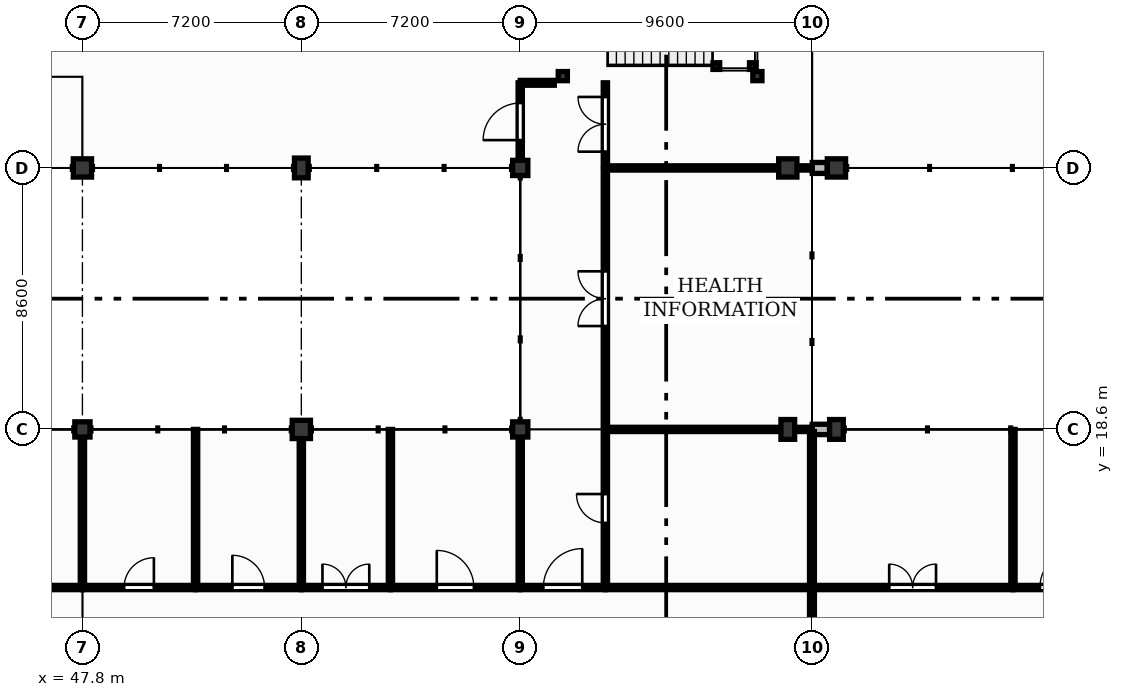
"""IFC4 building model, lengths in metres.
Left out: names, types, materials, properties, quantities, classifications, styles, units other than length and angle.
Written with IfcOpenShell. Run it as: python <this file> out.ifc"""

import sys

from ifc_helpers import new_model, si_unit, direction, frame, frame_2d, origin, origin_2d, place, context, subcontext, project, spatial, rectangle, hollow_circle, i_section, extrude, element, fill, save


model = new_model("IFC4")
c1 = context("Model", 3, precision=1e-05, world=origin(), true_north=direction((0.0, 1.0)))
c2 = subcontext(c1, "Body", "Model", "MODEL_VIEW")
j1 = project(units=[si_unit("LENGTHUNIT", "METRE"), si_unit("PLANEANGLEUNIT", "RADIAN")], contexts=[c1])
p1 = place(None, origin())
s1 = spatial("IfcSite", under=j1, at=p1, CompositionType="ELEMENT")
p2 = place(p1, origin())
s2 = spatial("IfcBuilding", under=s1, at=p2, CompositionType="ELEMENT")
p3 = place(p2, origin())
s3 = spatial("IfcBuildingStorey", under=s2, at=p3, CompositionType="ELEMENT", Elevation=0.0)
p4 = place(p3, frame((72.6, 18.6, 0.0), z_axis=(0.0, 0.0, 1.0), x_axis=(1.0, 0.0, 0.0)))
e1 = element("IfcColumn", 1, at=p4, inside=s3, PredefinedType="COLUMN", context=c2, shape_type="SweptSolid", body=[
    extrude(rectangle(XDim=0.45, YDim=0.65, at=origin_2d()), origin(), (0.0, 0.0, 1.0), 4.2),
])
p5 = place(p3, frame((72.6, 27.2, 0.0), z_axis=(0.0, 0.0, 1.0), x_axis=(1.0, 0.0, 0.0)))
e2 = element("IfcColumn", 2, at=p5, inside=s3, PredefinedType="COLUMN", context=c2, shape_type="SweptSolid", body=[
    extrude(rectangle(XDim=0.6, YDim=0.6, at=origin_2d()), origin(), (0.0, 0.0, 1.0), 4.2),
])
p6 = place(p3, frame((47.8, 18.6, 0.0), z_axis=(0.0, 0.0, 1.0), x_axis=(1.0, 0.0, 0.0)))
e3 = element("IfcColumn", 3, at=p6, inside=s3, PredefinedType="COLUMN", context=c2, shape_type="SweptSolid", body=[
    extrude(rectangle(XDim=0.5, YDim=0.5, at=origin_2d()), origin(), (0.0, 0.0, 1.0), 4.2),
])
for number, where, z_axis, x_axis in (
    (4, (47.8, 27.2, 0.0), (0.0, 0.0, 1.0), (1.0, 0.0, 0.0)),
    (5, (55.0, 18.6, 0.0), (0.0, 0.0, 1.0), (1.0, 0.0, 0.0)),
):
    element("IfcColumn", number, at=place(p3, frame(where, z_axis=z_axis, x_axis=x_axis)), inside=s3, PredefinedType="COLUMN", context=c2, shape_type="SweptSolid", body=[
        extrude(rectangle(XDim=0.6, YDim=0.6, at=origin_2d()), origin(), (0.0, 0.0, 1.0), 4.2),
    ])
p7 = place(p3, frame((55.0, 27.2, 0.0), z_axis=(0.0, 0.0, 1.0), x_axis=(1.0, 0.0, 0.0)))
e6 = element("IfcColumn", 6, at=p7, inside=s3, PredefinedType="COLUMN", context=c2, shape_type="SweptSolid", body=[
    extrude(rectangle(XDim=0.45, YDim=0.65, at=origin_2d()), origin(), (0.0, 0.0, 1.0), 4.2),
])
for number, where, z_axis, x_axis in (
    (7, (62.2, 18.6, 0.0), (0.0, 0.0, 1.0), (1.0, 0.0, 0.0)),
    (8, (62.2, 27.2, 0.0), (0.0, 0.0, 1.0), (1.0, 0.0, 0.0)),
):
    element("IfcColumn", number, at=place(p3, frame(where, z_axis=z_axis, x_axis=x_axis)), inside=s3, PredefinedType="COLUMN", context=c2, shape_type="SweptSolid", body=[
        extrude(rectangle(XDim=0.5, YDim=0.5, at=origin_2d()), origin(), (0.0, 0.0, 1.0), 4.2),
    ])
p8 = place(p3, frame((71.0, 18.6, 0.0), z_axis=(0.0, 0.0, 1.0), x_axis=(1.0, 0.0, 0.0)))
e9 = element("IfcColumn", 9, at=p8, inside=s3, PredefinedType="COLUMN", context=c2, shape_type="SweptSolid", body=[
    extrude(rectangle(XDim=0.45, YDim=0.65, at=origin_2d()), origin(), (0.0, 0.0, 1.0), 4.2),
])
p9 = place(p3, frame((71.0, 27.2, 0.0), z_axis=(0.0, 0.0, 1.0), x_axis=(1.0, 0.0, 0.0)))
e10 = element("IfcColumn", 10, at=p9, inside=s3, PredefinedType="COLUMN", context=c2, shape_type="SweptSolid", body=[
    extrude(rectangle(XDim=0.6, YDim=0.6, at=origin_2d()), origin(), (0.0, 0.0, 1.0), 4.2),
])
p10 = place(p3, frame((71.805, 18.6, 0.0), z_axis=(0.0, 0.0, 1.0), x_axis=(1.0, 0.0, 0.0)))
e11 = element("IfcWall", 11, at=p10, inside=s3, PredefinedType="SOLIDWALL", context=c2, shape_type="SweptSolid", body=[
    extrude(rectangle(XDim=0.57, YDim=0.34, at=frame_2d((0.285, 0.0))), origin(), (0.0, 0.0, 1.0), 4.2),
])
p11 = place(p3, frame((71.805, 27.2, 0.0), z_axis=(0.0, 0.0, 1.0), x_axis=(1.0, 0.0, 0.0)))
e12 = element("IfcWall", 12, at=p11, inside=s3, PredefinedType="SOLIDWALL", context=c2, shape_type="SweptSolid", body=[
    extrude(rectangle(XDim=0.495, YDim=0.36, at=frame_2d((0.248, 0.0))), origin(), (0.0, 0.0, 1.0), 4.2),
])
for number, where, z_axis, x_axis in (
    (13, (63.6, 30.22, 0.0), (0.0, 0.0, 1.0), (1.0, 0.0, 0.0)),
    (14, (70.0, 30.22, 0.0), (0.0, 0.0, 1.0), (1.0, 0.0, 0.0)),
):
    element("IfcColumn", number, at=place(p3, frame(where, z_axis=z_axis, x_axis=x_axis)), inside=s3, PredefinedType="COLUMN", context=c2, shape_type="SweptSolid", body=[
        extrude(i_section(OverallWidth=0.3, OverallDepth=0.3, WebThickness=0.011, FlangeThickness=0.019, FilletRadius=0.027, at=origin_2d()), origin(), (0.0, 0.0, 1.0), 4.2),
    ])
for number, where, z_axis, x_axis in (
    (15, (68.65, 30.55, 0.0), (0.0, 0.0, 1.0), (1.0, 0.0, 0.0)),
    (16, (69.85, 30.55, 0.0), (0.0, 0.0, 1.0), (1.0, 0.0, 0.0)),
):
    element("IfcColumn", number, at=place(p3, frame(where, z_axis=z_axis, x_axis=x_axis)), inside=s3, PredefinedType="COLUMN", context=c2, shape_type="SweptSolid", body=[
        extrude(hollow_circle(Radius=0.11, WallThickness=0.01, at=origin_2d()), origin(), (0.0, 0.0, 1.0), 2.03),
    ])
p12 = place(p3, frame((40.6, 13.4, 0.0), z_axis=(0.0, 0.0, 1.0), x_axis=(1.0, 0.0, 0.0)))
e17 = element("IfcWall", 17, at=p12, inside=s3, PredefinedType="PARTITIONING", context=c2, shape_type="SweptSolid", body=[
    extrude(rectangle(XDim=7.2, YDim=0.14, at=frame_2d((3.6, 0.0))), origin(), (0.0, 0.0, 1.0), 4.18),
])
p13 = place(p12, frame((2.99, 0.0, 0.0)))
e18 = element("IfcOpeningElement", 18, at=p13, cuts=e17, PredefinedType="OPENING", context=c2, shape_type="SweptSolid", body=[
    extrude(rectangle(XDim=1.22, YDim=2.1, at=frame_2d((0.61, 1.05))), frame((0.0, 0.08, 0.0), z_axis=(0.0, -1.0, 0.0), x_axis=(1.0, 0.0, 0.0)), (0.0, 0.0, 1.0), 0.16),
])
p14 = place(p3, frame((47.8, 13.47, 0.0), z_axis=(0.0, 0.0, 1.0), x_axis=(0.0, 1.0, 0.0)))
e19 = element("IfcWall", 19, at=p14, inside=s3, PredefinedType="PARTITIONING", context=c2, shape_type="SweptSolid", body=[
    extrude(rectangle(XDim=4.88, YDim=0.14, at=frame_2d((2.44, 0.0))), origin(), (0.0, 0.0, 1.0), 3.5),
])
p15 = place(p3, frame((47.8, 13.4, 0.0), z_axis=(0.0, 0.0, 1.0), x_axis=(1.0, 0.0, 0.0)))
e20 = element("IfcWall", 20, at=p15, inside=s3, PredefinedType="PARTITIONING", context=c2, shape_type="SweptSolid", body=[
    extrude(rectangle(XDim=3.722, YDim=0.14, at=frame_2d((1.861, 0.0))), origin(), (0.0, 0.0, 1.0), 4.18),
])
p16 = place(p15, frame((1.371, 0.0, 0.0)))
e21 = element("IfcOpeningElement", 21, at=p16, cuts=e20, PredefinedType="OPENING", context=c2, shape_type="SweptSolid", body=[
    extrude(rectangle(XDim=0.98, YDim=2.15, at=frame_2d((0.49, 1.075))), frame((0.0, 0.08, 0.0), z_axis=(0.0, -1.0, 0.0), x_axis=(1.0, 0.0, 0.0)), (0.0, 0.0, 1.0), 0.16),
])
p17 = place(p3, frame((51.522, 13.47, 0.0), z_axis=(0.0, 0.0, 1.0), x_axis=(0.0, 1.0, 0.0)))
e22 = element("IfcWall", 22, at=p17, inside=s3, PredefinedType="PARTITIONING", context=c2, shape_type="SweptSolid", body=[
    extrude(rectangle(XDim=5.13, YDim=0.14, at=frame_2d((2.565, 0.0))), origin(), (0.0, 0.0, 1.0), 4.18),
])
p18 = place(p3, frame((51.522, 13.4, 0.0), z_axis=(0.0, 0.0, 1.0), x_axis=(1.0, 0.0, 0.0)))
e23 = element("IfcWall", 23, at=p18, inside=s3, PredefinedType="PARTITIONING", context=c2, shape_type="SweptSolid", body=[
    extrude(rectangle(XDim=3.478, YDim=0.14, at=frame_2d((1.739, 0.0))), origin(), (0.0, 0.0, 1.0), 4.18),
])
p19 = place(p18, frame((1.209, 0.0, 0.0)))
e24 = element("IfcOpeningElement", 24, at=p19, cuts=e23, PredefinedType="OPENING", context=c2, shape_type="SweptSolid", body=[
    extrude(rectangle(XDim=1.06, YDim=2.15, at=frame_2d((0.53, 1.075))), frame((0.0, 0.08, 0.0), z_axis=(0.0, -1.0, 0.0), x_axis=(1.0, 0.0, 0.0)), (0.0, 0.0, 1.0), 0.16),
])
p20 = place(p3, frame((55.0, 13.47, 0.0), z_axis=(0.0, 0.0, 1.0), x_axis=(0.0, 1.0, 0.0)))
e25 = element("IfcWall", 25, at=p20, inside=s3, PredefinedType="PARTITIONING", context=c2, shape_type="SweptSolid", body=[
    extrude(rectangle(XDim=4.83, YDim=0.14, at=frame_2d((2.415, 0.0))), origin(), (0.0, 0.0, 1.0), 3.5),
])
p21 = place(p3, frame((55.0, 13.4, 0.0), z_axis=(0.0, 0.0, 1.0), x_axis=(1.0, 0.0, 0.0)))
e26 = element("IfcWall", 26, at=p21, inside=s3, PredefinedType="PARTITIONING", context=c2, shape_type="SweptSolid", body=[
    extrude(rectangle(XDim=2.93, YDim=0.14, at=frame_2d((1.465, 0.0))), origin(), (0.0, 0.0, 1.0), 4.18),
])
p22 = place(p21, frame((0.695, 0.0, 0.0)))
e27 = element("IfcOpeningElement", 27, at=p22, cuts=e26, PredefinedType="OPENING", context=c2, shape_type="SweptSolid", body=[
    extrude(rectangle(XDim=1.54, YDim=2.25, at=frame_2d((0.77, 1.125))), frame((0.0, 0.08, 0.0), z_axis=(0.0, -1.0, 0.0), x_axis=(1.0, 0.0, 0.0)), (0.0, 0.0, 1.0), 0.16),
])
p23 = place(p3, frame((57.93, 13.47, 0.0), z_axis=(0.0, 0.0, 1.0), x_axis=(0.0, 1.0, 0.0)))
e28 = element("IfcWall", 28, at=p23, inside=s3, PredefinedType="PARTITIONING", context=c2, shape_type="SweptSolid", body=[
    extrude(rectangle(XDim=5.13, YDim=0.14, at=frame_2d((2.565, 0.0))), origin(), (0.0, 0.0, 1.0), 4.18),
])
p24 = place(p3, frame((57.93, 13.4, 0.0), z_axis=(0.0, 0.0, 1.0), x_axis=(1.0, 0.0, 0.0)))
e29 = element("IfcWall", 29, at=p24, inside=s3, PredefinedType="PARTITIONING", context=c2, shape_type="SweptSolid", body=[
    extrude(rectangle(XDim=4.27, YDim=0.14, at=frame_2d((2.135, 0.0))), origin(), (0.0, 0.0, 1.0), 4.18),
])
p25 = place(p24, frame((1.525, 0.0, 0.0)))
e30 = element("IfcOpeningElement", 30, at=p25, cuts=e29, PredefinedType="OPENING", context=c2, shape_type="SweptSolid", body=[
    extrude(rectangle(XDim=1.22, YDim=2.1, at=frame_2d((0.61, 1.05))), frame((0.0, 0.08, 0.0), z_axis=(0.0, -1.0, 0.0), x_axis=(1.0, 0.0, 0.0)), (0.0, 0.0, 1.0), 0.16),
])
p26 = place(p3, frame((62.2, 13.47, 0.0), z_axis=(0.0, 0.0, 1.0), x_axis=(0.0, 1.0, 0.0)))
e31 = element("IfcWall", 31, at=p26, inside=s3, PredefinedType="PARTITIONING", context=c2, shape_type="SweptSolid", body=[
    extrude(rectangle(XDim=4.88, YDim=0.14, at=frame_2d((2.44, 0.0))), origin(), (0.0, 0.0, 1.0), 3.5),
])
p27 = place(p3, frame((62.2, 13.4, 0.0), z_axis=(0.0, 0.0, 1.0), x_axis=(1.0, 0.0, 0.0)))
e32 = element("IfcWall", 32, at=p27, inside=s3, PredefinedType="PARTITIONING", context=c2, shape_type="SweptSolid", body=[
    extrude(rectangle(XDim=2.8, YDim=0.14, at=frame_2d((1.4, 0.0))), origin(), (0.0, 0.0, 1.0), 4.18),
])
p28 = place(p27, frame((0.76, 0.0, 0.0)))
e33 = element("IfcOpeningElement", 33, at=p28, cuts=e32, PredefinedType="OPENING", context=c2, shape_type="SweptSolid", body=[
    extrude(rectangle(XDim=1.28, YDim=2.2, at=frame_2d((0.64, 1.1))), frame((0.0, 0.08, 0.0), z_axis=(0.0, -1.0, 0.0), x_axis=(1.0, 0.0, 0.0)), (0.0, 0.0, 1.0), 0.16),
])
p29 = place(p3, frame((62.2, 27.45, 0.0), z_axis=(0.0, 0.0, 1.0), x_axis=(0.0, 1.0, 0.0)))
e34 = element("IfcWall", 34, at=p29, inside=s3, PredefinedType="PARTITIONING", context=c2, shape_type="SweptSolid", body=[
    extrude(rectangle(XDim=2.55, YDim=0.14, at=frame_2d((1.275, 0.0))), origin(), (0.0, 0.0, 1.0), 3.4),
])
p30 = place(p29, frame((0.665, 0.0, 0.0)))
e35 = element("IfcOpeningElement", 35, at=p30, cuts=e34, PredefinedType="OPENING", context=c2, shape_type="SweptSolid", body=[
    extrude(rectangle(XDim=1.22, YDim=2.1, at=frame_2d((0.61, 1.05))), frame((0.0, 0.08, 0.0), z_axis=(0.0, -1.0, 0.0), x_axis=(1.0, 0.0, 0.0)), (0.0, 0.0, 1.0), 0.16),
])
p31 = place(p3, frame((65.0, 13.47, 0.0), z_axis=(0.0, 0.0, 1.0), x_axis=(0.0, 1.0, 0.0)))
e36 = element("IfcWall", 36, at=p31, inside=s3, PredefinedType="PARTITIONING", context=c2, shape_type="SweptSolid", body=[
    extrude(rectangle(XDim=5.06, YDim=0.14, at=frame_2d((2.53, 0.0))), origin(), (0.0, 0.0, 1.0), 4.18),
])
p32 = place(p31, frame((2.055, 0.0, 0.0)))
e37 = element("IfcOpeningElement", 37, at=p32, cuts=e36, PredefinedType="OPENING", context=c2, shape_type="SweptSolid", body=[
    extrude(rectangle(XDim=0.95, YDim=2.1, at=frame_2d((0.475, 1.05))), frame((0.0, 0.08, 0.0), z_axis=(0.0, -1.0, 0.0), x_axis=(1.0, 0.0, 0.0)), (0.0, 0.0, 1.0), 0.16),
])
p33 = place(p3, frame((65.0, 13.4, 0.0), z_axis=(0.0, 0.0, 1.0), x_axis=(1.0, 0.0, 0.0)))
e38 = element("IfcWall", 38, at=p33, inside=s3, PredefinedType="PARTITIONING", context=c2, shape_type="SweptSolid", body=[
    extrude(rectangle(XDim=6.795, YDim=0.14, at=frame_2d((3.397, 0.0))), origin(), (0.0, 0.0, 1.0), 4.18),
])
p34 = place(p3, frame((65.0, 18.67, 0.0), z_axis=(0.0, 0.0, 1.0), x_axis=(0.0, 1.0, 0.0)))
e39 = element("IfcWall", 39, at=p34, inside=s3, PredefinedType="PARTITIONING", context=c2, shape_type="SweptSolid", body=[
    extrude(rectangle(XDim=8.46, YDim=0.14, at=frame_2d((4.23, 0.0))), origin(), (0.0, 0.0, 1.0), 4.18),
])
p35 = place(p34, frame((3.33, 0.0, 0.0)))
e40 = element("IfcOpeningElement", 40, at=p35, cuts=e39, PredefinedType="OPENING", context=c2, shape_type="SweptSolid", body=[
    extrude(rectangle(XDim=1.8, YDim=2.3, at=frame_2d((0.9, 1.15))), frame((0.0, 0.08, 0.0), z_axis=(0.0, -1.0, 0.0), x_axis=(1.0, 0.0, 0.0)), (0.0, 0.0, 1.0), 0.16),
])
p36 = place(p3, frame((65.0, 18.6, 0.0), z_axis=(0.0, 0.0, 1.0), x_axis=(1.0, 0.0, 0.0)))
e41 = element("IfcWall", 41, at=p36, inside=s3, PredefinedType="PARTITIONING", context=c2, shape_type="SweptSolid", body=[
    extrude(rectangle(XDim=5.775, YDim=0.14, at=frame_2d((2.887, 0.0))), origin(), (0.0, 0.0, 1.0), 3.15),
])
p37 = place(p3, frame((71.225, 18.6, 0.0), z_axis=(0.0, 0.0, 1.0), x_axis=(1.0, 0.0, 0.0)))
e42 = element("IfcWall", 42, at=p37, inside=s3, PredefinedType="PARTITIONING", context=c2, shape_type="SweptSolid", body=[
    extrude(rectangle(XDim=0.57, YDim=0.14, at=frame_2d((0.285, 0.0))), origin(), (0.0, 0.0, 1.0), 4.18),
])
p38 = place(p3, frame((65.0, 27.27, 0.0), z_axis=(0.0, 0.0, 1.0), x_axis=(0.0, 1.0, 0.0)))
e43 = element("IfcWall", 43, at=p38, inside=s3, PredefinedType="PARTITIONING", context=c2, shape_type="SweptSolid", body=[
    extrude(rectangle(XDim=2.73, YDim=0.14, at=frame_2d((1.365, 0.0))), origin(), (0.0, 0.0, 1.0), 4.18),
])
p39 = place(p38, frame((0.465, 0.0, 0.0)))
e44 = element("IfcOpeningElement", 44, at=p39, cuts=e43, PredefinedType="OPENING", context=c2, shape_type="SweptSolid", body=[
    extrude(rectangle(XDim=1.8, YDim=2.3, at=frame_2d((0.9, 1.15))), frame((0.0, 0.08, 0.0), z_axis=(0.0, -1.0, 0.0), x_axis=(1.0, 0.0, 0.0)), (0.0, 0.0, 1.0), 0.16),
])
p40 = place(p3, frame((65.0, 27.2, 0.0), z_axis=(0.0, 0.0, 1.0), x_axis=(1.0, 0.0, 0.0)))
e45 = element("IfcWall", 45, at=p40, inside=s3, PredefinedType="PARTITIONING", context=c2, shape_type="SweptSolid", body=[
    extrude(rectangle(XDim=5.7, YDim=0.14, at=frame_2d((2.85, 0.0))), origin(), (0.0, 0.0, 1.0), 3.4),
])
p41 = place(p3, frame((71.3, 27.2, 0.0), z_axis=(0.0, 0.0, 1.0), x_axis=(1.0, 0.0, 0.0)))
e46 = element("IfcWall", 46, at=p41, inside=s3, PredefinedType="PARTITIONING", context=c2, shape_type="SweptSolid", body=[
    extrude(rectangle(XDim=0.495, YDim=0.14, at=frame_2d((0.248, 0.0))), origin(), (0.0, 0.0, 1.0), 4.18),
])
p42 = place(p3, frame((71.805, 13.4, 0.0), z_axis=(0.0, 0.0, 1.0), x_axis=(1.0, 0.0, 0.0)))
e47 = element("IfcWall", 47, at=p42, inside=s3, PredefinedType="PARTITIONING", context=c2, shape_type="SweptSolid", body=[
    extrude(rectangle(XDim=6.601, YDim=0.14, at=frame_2d((3.301, 0.0))), origin(), (0.0, 0.0, 1.0), 4.18),
])
p43 = place(p42, frame((2.531, 0.0, 0.0)))
e48 = element("IfcOpeningElement", 48, at=p43, cuts=e47, PredefinedType="OPENING", context=c2, shape_type="SweptSolid", body=[
    extrude(rectangle(XDim=1.54, YDim=2.25, at=frame_2d((0.77, 1.125))), frame((0.0, 0.08, 0.0), z_axis=(0.0, -1.0, 0.0), x_axis=(1.0, 0.0, 0.0)), (0.0, 0.0, 1.0), 0.16),
])
p44 = place(p3, frame((78.406, 13.47, 0.0), z_axis=(0.0, 0.0, 1.0), x_axis=(0.0, 1.0, 0.0)))
e49 = element("IfcWall", 49, at=p44, inside=s3, PredefinedType="PARTITIONING", context=c2, shape_type="SweptSolid", body=[
    extrude(rectangle(XDim=5.13, YDim=0.14, at=frame_2d((2.565, 0.0))), origin(), (0.0, 0.0, 1.0), 4.18),
])
p45 = place(p3, frame((78.406, 13.4, 0.0), z_axis=(0.0, 0.0, 1.0), x_axis=(1.0, 0.0, 0.0)))
e50 = element("IfcWall", 50, at=p45, inside=s3, PredefinedType="PARTITIONING", context=c2, shape_type="SweptSolid", body=[
    extrude(rectangle(XDim=2.994, YDim=0.14, at=frame_2d((1.497, 0.0))), origin(), (0.0, 0.0, 1.0), 4.18),
])
p46 = place(p45, frame((0.887, 0.0, 0.0)))
e51 = element("IfcOpeningElement", 51, at=p46, cuts=e50, PredefinedType="OPENING", context=c2, shape_type="SweptSolid", body=[
    extrude(rectangle(XDim=1.22, YDim=2.1, at=frame_2d((0.61, 1.05))), frame((0.0, 0.08, 0.0), z_axis=(0.0, -1.0, 0.0), x_axis=(1.0, 0.0, 0.0)), (0.0, 0.0, 1.0), 0.16),
])
p47 = place(p3, frame((71.795, 10.87, 0.0), z_axis=(0.0, 0.0, 1.0), x_axis=(0.0, 1.0, 0.0)))
e52 = element("IfcWall", 52, at=p47, inside=s3, PredefinedType="PARTITIONING", context=c2, shape_type="SweptSolid", body=[
    extrude(rectangle(XDim=2.46, YDim=0.16, at=frame_2d((1.23, 0.0))), origin(), (0.0, 0.0, 1.0), 4.18),
])
p48 = place(p3, frame((63.32, 30.0, 0.0), z_axis=(0.0, 0.0, 1.0), x_axis=(-1.0, 0.0, 0.0)))
e53 = element("IfcWall", 53, at=p48, inside=s3, PredefinedType="PARTITIONING", context=c2, shape_type="SweptSolid", body=[
    extrude(rectangle(XDim=1.12, YDim=0.16, at=frame_2d((0.56, 0.0))), origin(), (0.0, 0.0, 1.0), 4.18),
])
p49 = place(p3, frame((71.795, 13.47, 0.0), z_axis=(0.0, 0.0, 1.0), x_axis=(0.0, 1.0, 0.0)))
e54 = element("IfcWall", 54, at=p49, inside=s3, PredefinedType="PARTITIONING", context=c2, shape_type="SweptSolid", body=[
    extrude(rectangle(XDim=5.06, YDim=0.16, at=frame_2d((2.53, 0.0))), origin(), (0.0, 0.0, 1.0), 4.18),
])
p50 = place(p28, origin())
e55 = element("IfcDoor", 55, at=p50, inside=s3, OperationType="SINGLE_SWING_RIGHT", PredefinedType="DOOR", context=c2, shape_type="SweptSolid", body=[
    extrude(rectangle(XDim=1.28, YDim=2.2, at=frame_2d((0.64, 1.1))), frame((0.0, 0.025, 0.0), z_axis=(0.0, -1.0, 0.0), x_axis=(1.0, 0.0, 0.0)), (0.0, 0.0, 1.0), 0.05),
])
fill(e33, e55)
p51 = place(p30, origin())
e56 = element("IfcDoor", 56, at=p51, inside=s3, OperationType="SINGLE_SWING_LEFT", PredefinedType="DOOR", context=c2, shape_type="SweptSolid", body=[
    extrude(rectangle(XDim=1.22, YDim=2.1, at=frame_2d((0.61, 1.05))), frame((0.0, 0.025, 0.0), z_axis=(0.0, -1.0, 0.0), x_axis=(1.0, 0.0, 0.0)), (0.0, 0.0, 1.0), 0.05),
])
fill(e35, e56)
p52 = place(p39, origin())
e57 = element("IfcDoor", 57, at=p52, inside=s3, OperationType="DOUBLE_DOOR_SINGLE_SWING", PredefinedType="DOOR", context=c2, shape_type="SweptSolid", body=[
    extrude(rectangle(XDim=1.8, YDim=2.3, at=frame_2d((0.9, 1.15))), frame((0.0, 0.025, 0.0), z_axis=(0.0, -1.0, 0.0), x_axis=(1.0, 0.0, 0.0)), (0.0, 0.0, 1.0), 0.05),
])
fill(e44, e57)
p53 = place(p35, origin())
e58 = element("IfcDoor", 58, at=p53, inside=s3, OperationType="DOUBLE_DOOR_SINGLE_SWING", PredefinedType="DOOR", context=c2, shape_type="SweptSolid", body=[
    extrude(rectangle(XDim=1.8, YDim=2.3, at=frame_2d((0.9, 1.15))), frame((0.0, 0.025, 0.0), z_axis=(0.0, -1.0, 0.0), x_axis=(1.0, 0.0, 0.0)), (0.0, 0.0, 1.0), 0.05),
])
fill(e40, e58)
p54 = place(p16, origin())
e59 = element("IfcDoor", 59, at=p54, inside=s3, OperationType="SINGLE_SWING_RIGHT", PredefinedType="DOOR", context=c2, shape_type="SweptSolid", body=[
    extrude(rectangle(XDim=0.98, YDim=2.15, at=frame_2d((0.49, 1.075))), frame((0.0, 0.025, 0.0), z_axis=(0.0, -1.0, 0.0), x_axis=(1.0, 0.0, 0.0)), (0.0, 0.0, 1.0), 0.05),
])
fill(e21, e59)
p55 = place(p19, origin())
e60 = element("IfcDoor", 60, at=p55, inside=s3, OperationType="SINGLE_SWING_LEFT", PredefinedType="DOOR", context=c2, shape_type="SweptSolid", body=[
    extrude(rectangle(XDim=1.06, YDim=2.15, at=frame_2d((0.53, 1.075))), frame((0.0, 0.025, 0.0), z_axis=(0.0, -1.0, 0.0), x_axis=(1.0, 0.0, 0.0)), (0.0, 0.0, 1.0), 0.05),
])
fill(e24, e60)
p56 = place(p22, origin())
e61 = element("IfcDoor", 61, at=p56, inside=s3, OperationType="DOUBLE_DOOR_SINGLE_SWING", PredefinedType="DOOR", context=c2, shape_type="SweptSolid", body=[
    extrude(rectangle(XDim=1.54, YDim=2.25, at=frame_2d((0.77, 1.125))), frame((0.0, 0.025, 0.0), z_axis=(0.0, -1.0, 0.0), x_axis=(1.0, 0.0, 0.0)), (0.0, 0.0, 1.0), 0.05),
])
fill(e27, e61)
p57 = place(p25, origin())
e62 = element("IfcDoor", 62, at=p57, inside=s3, OperationType="SINGLE_SWING_LEFT", PredefinedType="DOOR", context=c2, shape_type="SweptSolid", body=[
    extrude(rectangle(XDim=1.22, YDim=2.1, at=frame_2d((0.61, 1.05))), frame((0.0, 0.025, 0.0), z_axis=(0.0, -1.0, 0.0), x_axis=(1.0, 0.0, 0.0)), (0.0, 0.0, 1.0), 0.05),
])
fill(e30, e62)
p58 = place(p32, origin())
e63 = element("IfcDoor", 63, at=p58, inside=s3, OperationType="SINGLE_SWING_RIGHT", PredefinedType="DOOR", context=c2, shape_type="SweptSolid", body=[
    extrude(rectangle(XDim=0.95, YDim=2.1, at=frame_2d((0.475, 1.05))), frame((0.0, 0.025, 0.0), z_axis=(0.0, -1.0, 0.0), x_axis=(1.0, 0.0, 0.0)), (0.0, 0.0, 1.0), 0.05),
])
fill(e37, e63)
p59 = place(p43, origin())
e64 = element("IfcDoor", 64, at=p59, inside=s3, OperationType="DOUBLE_DOOR_SINGLE_SWING", PredefinedType="DOOR", context=c2, shape_type="SweptSolid", body=[
    extrude(rectangle(XDim=1.54, YDim=2.25, at=frame_2d((0.77, 1.125))), frame((0.0, 0.025, 0.0), z_axis=(0.0, -1.0, 0.0), x_axis=(1.0, 0.0, 0.0)), (0.0, 0.0, 1.0), 0.05),
])
fill(e48, e64)
p60 = place(p46, origin())
e65 = element("IfcDoor", 65, at=p60, inside=s3, OperationType="SINGLE_SWING_RIGHT", PredefinedType="DOOR", context=c2, shape_type="SweptSolid", body=[
    extrude(rectangle(XDim=1.22, YDim=2.1, at=frame_2d((0.61, 1.05))), frame((0.0, 0.025, 0.0), z_axis=(0.0, -1.0, 0.0), x_axis=(1.0, 0.0, 0.0)), (0.0, 0.0, 1.0), 0.05),
])
fill(e51, e65)
save(model, sys.argv[1])
